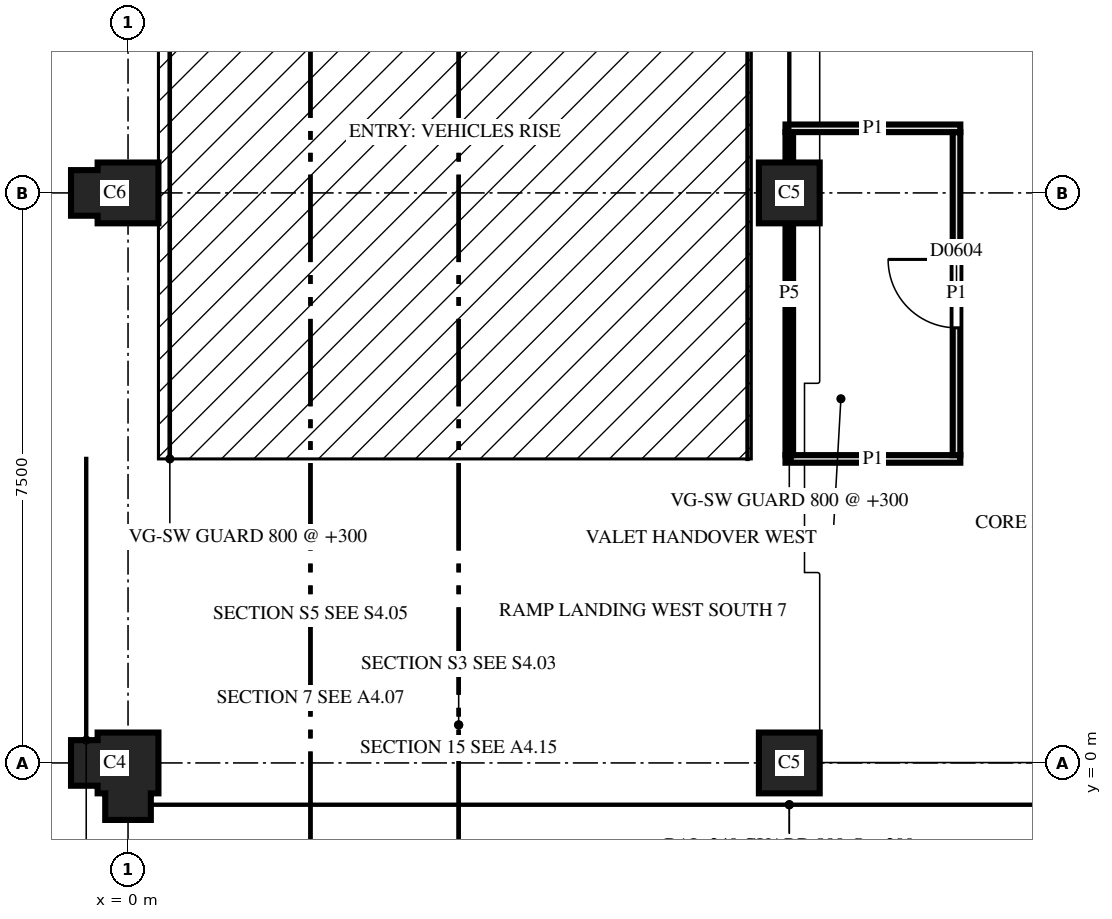
"""IFC4 building model, lengths in metres.
Left out: names, types, materials, properties, quantities, classifications, styles, units other than length and angle.
Written with IfcOpenShell. Run it as: python <this file> out.ifc"""

import sys

from ifc_helpers import new_model, si_unit, direction, frame, frame_2d, origin, place, context, subcontext, project, spatial, polyline, rectangle, outline, extrude, element, fill, save


model = new_model("IFC4")
c1 = context("Model", 3, precision=1e-05, world=origin(), true_north=direction((0.0, 1.0)))
c2 = subcontext(c1, "Body", "Model", "MODEL_VIEW")
j1 = project(units=[si_unit("LENGTHUNIT", "METRE"), si_unit("PLANEANGLEUNIT", "RADIAN")], contexts=[c1])
p1 = place(None, origin())
s1 = spatial("IfcSite", under=j1, at=p1, CompositionType="ELEMENT")
p2 = place(p1, origin())
s2 = spatial("IfcBuilding", under=s1, at=p2, CompositionType="ELEMENT")
p3 = place(p2, frame((0.0, 0.0, 23.0)))
s3 = spatial("IfcBuildingStorey", under=s2, at=p3, CompositionType="ELEMENT", Elevation=23.0)
p4 = place(p3, frame((0.0, 0.0, 0.0), z_axis=(0.0, 0.0, 1.0), x_axis=(-1.0, 0.0, 0.0)))
e1 = element("IfcColumn", 1, at=p4, inside=s3, PredefinedType="COLUMN", context=c2, shape_type="SweptSolid", body=[
    extrude(outline(polyline([(-0.4, -0.4), (0.4, -0.4), (0.4, -0.3), (0.75, -0.3), (0.75, 0.3), (0.4, 0.3), (0.4, 0.4), (0.3, 0.4), (0.3, 0.75), (-0.3, 0.75), (-0.3, 0.4), (-0.4, 0.4), (-0.4, -0.4)])), origin(), (0.0, 0.0, 1.0), 3.7),
])
p5 = place(p3, frame((8.7, 0.0, 0.0), z_axis=(0.0, 0.0, 1.0), x_axis=(1.0, 0.0, 0.0)))
e2 = element("IfcColumn", 2, at=p5, inside=s3, PredefinedType="COLUMN", context=c2, shape_type="SweptSolid", body=[
    extrude(outline(polyline([(-0.4, -0.4), (0.4, -0.4), (0.4, 0.4), (-0.4, 0.4), (-0.4, -0.4)])), origin(), (0.0, 0.0, 1.0), 3.7),
])
p6 = place(p3, frame((0.0, 7.5, 0.0), z_axis=(0.0, 0.0, 1.0), x_axis=(-1.0, 0.0, 0.0)))
e3 = element("IfcColumn", 3, at=p6, inside=s3, PredefinedType="COLUMN", context=c2, shape_type="SweptSolid", body=[
    extrude(outline(polyline([(-0.4, -0.4), (0.4, -0.4), (0.4, -0.3), (0.75, -0.3), (0.75, 0.3), (0.4, 0.3), (0.4, 0.4), (-0.4, 0.4), (-0.4, -0.4)])), origin(), (0.0, 0.0, 1.0), 3.7),
])
p7 = place(p3, frame((8.7, 7.5, 0.0), z_axis=(0.0, 0.0, 1.0), x_axis=(1.0, 0.0, 0.0)))
e4 = element("IfcColumn", 4, at=p7, inside=s3, PredefinedType="COLUMN", context=c2, shape_type="SweptSolid", body=[
    extrude(outline(polyline([(-0.4, -0.4), (0.4, -0.4), (0.4, 0.4), (-0.4, 0.4), (-0.4, -0.4)])), origin(), (0.0, 0.0, 1.0), 3.7),
])
p8 = place(p3, frame((8.65, 4.0, 0.0), z_axis=(0.0, 0.0, 1.0), x_axis=(1.0, 0.0, 0.0)))
e5 = element("IfcWall", 5, at=p8, inside=s3, PredefinedType="PARTITIONING", context=c2, shape_type="SweptSolid", body=[
    extrude(rectangle(XDim=2.3, YDim=0.1, at=frame_2d((1.15, 0.0))), origin(), (0.0, 0.0, 1.0), 2.88),
])
p9 = place(p3, frame((10.9, 4.05, 0.0), z_axis=(0.0, 0.0, 1.0), x_axis=(0.0, 1.0, 0.0)))
e6 = element("IfcWall", 6, at=p9, inside=s3, PredefinedType="PARTITIONING", context=c2, shape_type="SweptSolid", body=[
    extrude(rectangle(XDim=4.25, YDim=0.1, at=frame_2d((2.125, 0.0))), origin(), (0.0, 0.0, 1.0), 2.88),
])
p10 = place(p9, frame((1.675, 0.0, 0.0)))
e7 = element("IfcOpeningElement", 7, at=p10, cuts=e6, PredefinedType="OPENING", context=c2, shape_type="SweptSolid", body=[
    extrude(rectangle(XDim=0.9, YDim=2.1, at=frame_2d((0.45, 1.05))), frame((0.0, 0.06, 0.0), z_axis=(0.0, -1.0, 0.0), x_axis=(1.0, 0.0, 0.0)), (0.0, 0.0, 1.0), 0.12),
])
p11 = place(p3, frame((8.7, 8.3, 0.0), z_axis=(0.0, 0.0, 1.0), x_axis=(0.0, -1.0, 0.0)))
e8 = element("IfcWall", 8, at=p11, inside=s3, PredefinedType="PARTITIONING", context=c2, shape_type="SweptSolid", body=[
    extrude(rectangle(XDim=4.25, YDim=0.1, at=frame_2d((2.125, 0.0))), origin(), (0.0, 0.0, 1.0), 2.6),
])
p12 = place(p3, frame((10.95, 8.35, 0.0), z_axis=(0.0, 0.0, 1.0), x_axis=(-1.0, 0.0, 0.0)))
e9 = element("IfcWall", 9, at=p12, inside=s3, PredefinedType="PARTITIONING", context=c2, shape_type="SweptSolid", body=[
    extrude(rectangle(XDim=2.3, YDim=0.1, at=frame_2d((1.15, 0.0))), origin(), (0.0, 0.0, 1.0), 2.88),
])
p13 = place(p10, origin())
e10 = element("IfcDoor", 10, at=p13, inside=s3, OperationType="SINGLE_SWING_LEFT", PredefinedType="DOOR", context=c2, shape_type="SweptSolid", body=[
    extrude(rectangle(XDim=0.9, YDim=2.1, at=frame_2d((0.45, 1.05))), frame((0.0, 0.025, 0.0), z_axis=(0.0, -1.0, 0.0), x_axis=(1.0, 0.0, 0.0)), (0.0, 0.0, 1.0), 0.05),
])
fill(e7, e10)
save(model, sys.argv[1])
